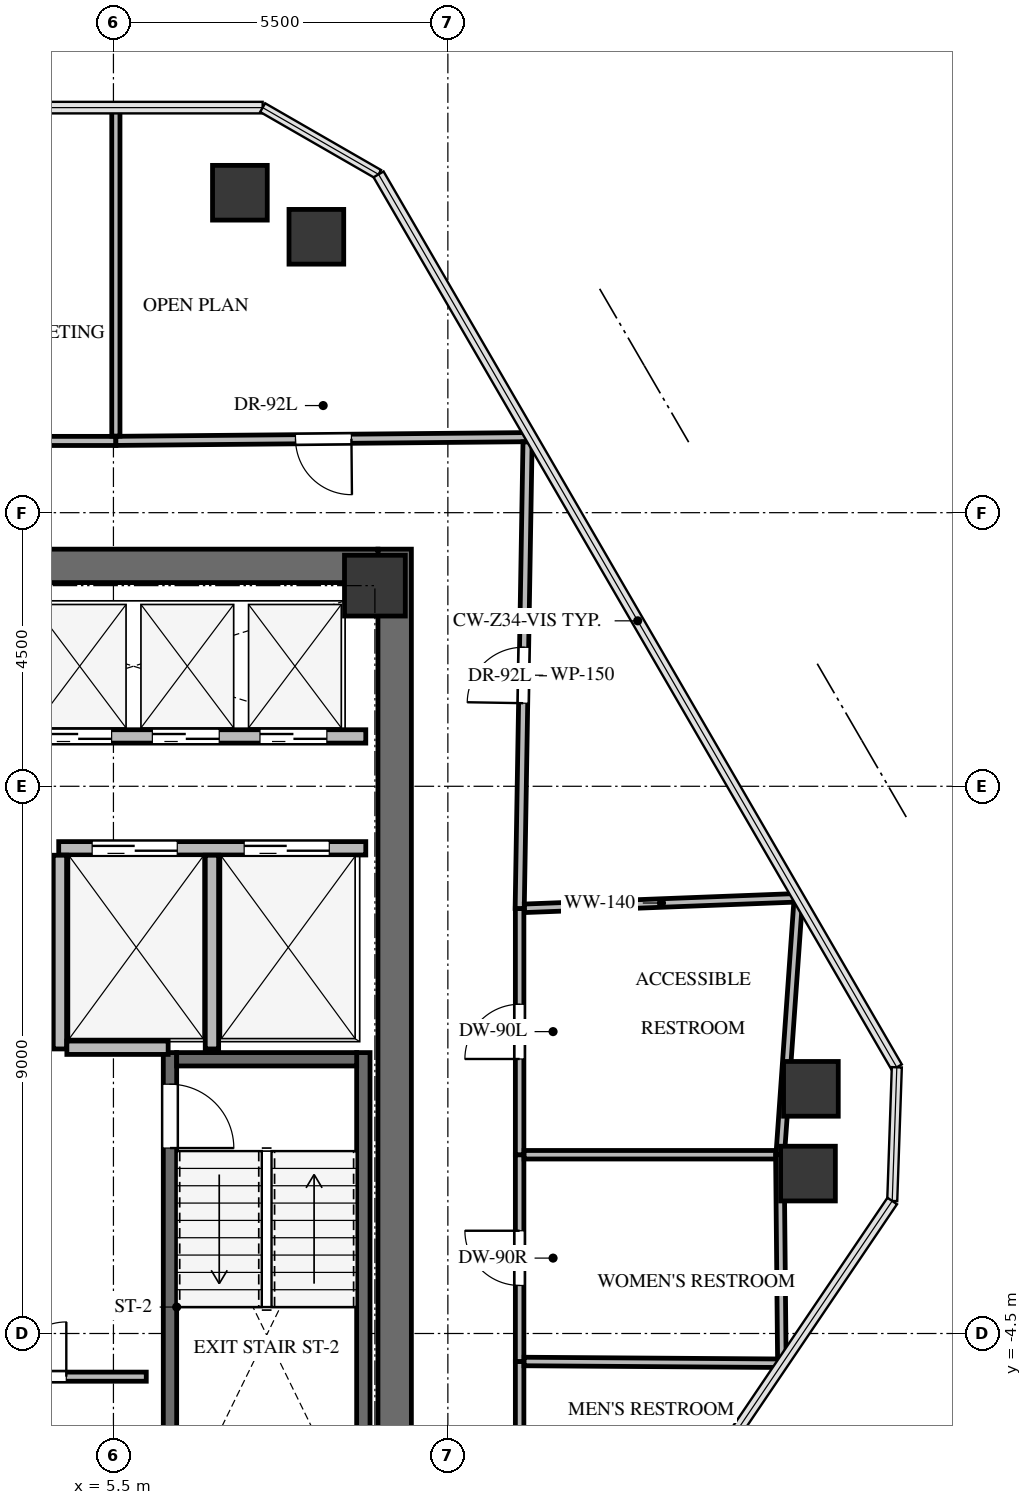
"""IFC4 building model, lengths in metres.
Left out: names, types, materials, properties, quantities, classifications, styles, units other than length and angle.
Written with IfcOpenShell. Run it as: python <this file> out.ifc"""

import sys

from ifc_helpers import new_model, si_unit, direction, frame, frame_2d, origin, origin_2d, place, context, subcontext, project, spatial, rectangle, extrude, source, transform, mapped, element, fill, save


model = new_model("IFC4")
c1 = context("Model", 3, precision=1e-05, world=origin(), true_north=direction((0.0, 1.0)))
c2 = subcontext(c1, "Body", "Model", "MODEL_VIEW")
j1 = project(units=[si_unit("LENGTHUNIT", "METRE"), si_unit("PLANEANGLEUNIT", "RADIAN")], contexts=[c1])
p1 = place(None, origin())
s1 = spatial("IfcSite", under=j1, at=p1, CompositionType="ELEMENT")
p2 = place(p1, origin())
s2 = spatial("IfcBuilding", under=s1, at=p2, CompositionType="ELEMENT")
p3 = place(p2, frame((0.0, 0.0, 254.7)))
s3 = spatial("IfcBuildingStorey", under=s2, at=p3, CompositionType="ELEMENT", Elevation=254.7)
p4 = place(p3, frame((10.125, -8.4, 0.0), z_axis=(0.0, 0.0, 1.0), x_axis=(0.0, 1.0, 0.0)))
e1 = element("IfcWall", 1, at=p4, inside=s3, PredefinedType="SHEAR", context=c2, shape_type="SweptSolid", body=[
    extrude(rectangle(XDim=16.8, YDim=0.55, at=frame_2d((8.4, 0.0))), origin(), (0.0, 0.0, 1.0), 3.4),
])
p5 = place(p3, frame((-9.85, 8.125, 0.0), z_axis=(0.0, 0.0, 1.0), x_axis=(1.0, 0.0, 0.0)))
e2 = element("IfcWall", 2, at=p5, inside=s3, PredefinedType="SHEAR", context=c2, shape_type="SweptSolid", body=[
    extrude(rectangle(XDim=19.7, YDim=0.55, at=frame_2d((9.85, 0.0))), origin(), (0.0, 0.0, 1.0), 3.4),
])
p6 = place(p3, frame((9.61, -7.77, -0.24), z_axis=(0.0, 0.0, 1.0), x_axis=(0.0, 1.0, 0.0)))
e3 = element("IfcWall", 3, at=p6, inside=s3, PredefinedType="SHEAR", context=c2, shape_type="SweptSolid", body=[
    extrude(rectangle(XDim=7.89, YDim=0.22, at=frame_2d((3.945, 0.0))), origin(), (0.0, 0.0, 1.0), 3.4),
])
p7 = place(p3, frame((6.43, 0.12, -0.24), z_axis=(0.0, 0.0, 1.0), x_axis=(0.0, -1.0, 0.0)))
e4 = element("IfcWall", 4, at=p7, inside=s3, PredefinedType="SHEAR", context=c2, shape_type="SweptSolid", body=[
    extrude(rectangle(XDim=7.89, YDim=0.22, at=frame_2d((3.945, 0.0))), origin(), (0.0, 0.0, 1.0), 3.4),
])
p8 = place(p7, frame((0.52, 0.0, 0.0)))
e5 = element("IfcOpeningElement", 5, at=p8, cuts=e4, PredefinedType="OPENING", context=c2, shape_type="SweptSolid", body=[
    extrude(rectangle(XDim=1.05, YDim=2.15, at=frame_2d((0.525, 1.075))), frame((0.0, 0.12, 0.0), z_axis=(0.0, -1.0, 0.0), x_axis=(1.0, 0.0, 0.0)), (0.0, 0.0, 1.0), 0.24),
])
p9 = place(p3, frame((9.5, 0.01, -0.24), z_axis=(0.0, 0.0, 1.0), x_axis=(-1.0, 0.0, 0.0)))
e6 = element("IfcWall", 6, at=p9, inside=s3, PredefinedType="SHEAR", context=c2, shape_type="SweptSolid", body=[
    extrude(rectangle(XDim=2.96, YDim=0.22, at=frame_2d((1.48, 0.0))), origin(), (0.0, 0.0, 1.0), 3.4),
])
m1 = source(origin(), c2, "Body", "SweptSolid", [
    extrude(rectangle(XDim=1.0, YDim=1.0, at=origin_2d()), origin(), (0.0, 0.0, 1.0), 3.4),
])
p10 = place(p3, frame((9.8, 7.8, -0.24), z_axis=(0.0, 0.0, 1.0), x_axis=(1.0, 0.0, 0.0)))
e7 = element("IfcColumn", 7, at=p10, inside=s3, PredefinedType="COLUMN", context=c2, shape_type="MappedRepresentation", body=[
    mapped(m1, transform((0.0, 0.0, 0.0), x_axis=(1.0, 0.0, 0.0), y_axis=(0.0, 1.0, 0.0), z_axis=(0.0, 0.0, 1.0), scale=1.0)),
])
m2 = source(origin(), c2, "Body", "SweptSolid", [
    extrude(rectangle(XDim=0.9, YDim=0.9, at=origin_2d()), origin(), (0.0, 0.0, 1.0), 3.4),
])
for number, where, z_axis, x_axis in (
    (8, (7.58, 14.262, -0.24), (0.0, 0.0, 1.0), (1.0, 0.0, 0.0)),
    (9, (8.837, 13.538, -0.24), (0.0, 0.0, 1.0), (1.0, 0.0, 0.0)),
    (10, (16.97, -0.476, -0.24), (0.0, 0.0, 1.0), (1.0, 0.0, 0.0)),
    (11, (16.922, -1.87, -0.24), (0.0, 0.0, 1.0), (1.0, 0.0, 0.0)),
):
    element("IfcColumn", number, at=place(p3, frame(where, z_axis=z_axis, x_axis=x_axis)), inside=s3, PredefinedType="COLUMN", context=c2, shape_type="MappedRepresentation", body=[
        mapped(m2, transform((0.0, 0.0, 0.0), x_axis=(1.0, 0.0, 0.0), y_axis=(0.0, 1.0, 0.0), z_axis=(0.0, 0.0, 1.0), scale=1.0)),
    ])
p11 = place(p3, frame((4.6, 3.48, 0.0), z_axis=(0.0, 0.0, 1.0), x_axis=(1.0, 0.0, 0.0)))
e12 = element("IfcWall", 12, at=p11, inside=s3, PredefinedType="SOLIDWALL", context=c2, shape_type="SweptSolid", body=[
    extrude(rectangle(XDim=5.05, YDim=0.22, at=frame_2d((2.525, 0.0))), origin(), (0.0, 0.0, 1.0), 3.145),
])
p12 = place(p11, frame((0.55, 0.0, 0.0)))
e13 = element("IfcOpeningElement", 13, at=p12, cuts=e12, PredefinedType="OPENING", context=c2, shape_type="SweptSolid", body=[
    extrude(rectangle(XDim=1.4, YDim=2.15, at=frame_2d((0.7, 1.075))), frame((0.0, 0.12, 0.0), z_axis=(0.0, -1.0, 0.0), x_axis=(1.0, 0.0, 0.0)), (0.0, 0.0, 1.0), 0.24),
])
p13 = place(p11, frame((3.05, 0.0, 0.0)))
e14 = element("IfcOpeningElement", 14, at=p13, cuts=e12, PredefinedType="OPENING", context=c2, shape_type="SweptSolid", body=[
    extrude(rectangle(XDim=1.4, YDim=2.15, at=frame_2d((0.7, 1.075))), frame((0.0, 0.12, 0.0), z_axis=(0.0, -1.0, 0.0), x_axis=(1.0, 0.0, 0.0)), (0.0, 0.0, 1.0), 0.24),
])
for number, where, z_axis, x_axis in (
    (15, (4.62, 0.18, 0.0), (0.0, 0.0, 1.0), (0.0, 1.0, 0.0)),
    (16, (7.12, 0.18, 0.0), (0.0, 0.0, 1.0), (0.0, 1.0, 0.0)),
):
    element("IfcWall", number, at=place(p3, frame(where, z_axis=z_axis, x_axis=x_axis)), inside=s3, PredefinedType="SOLIDWALL", context=c2, shape_type="SweptSolid", body=[
        extrude(rectangle(XDim=3.186, YDim=0.22, at=frame_2d((1.593, 0.0))), origin(), (0.0, 0.0, 1.0), 3.145),
    ])
p14 = place(p3, frame((4.734, 0.2, 0.0), z_axis=(0.0, 0.0, 1.0), x_axis=(1.0, 0.0, 0.0)))
e17 = element("IfcWall", 17, at=p14, inside=s3, PredefinedType="SOLIDWALL", context=c2, shape_type="SweptSolid", body=[
    extrude(rectangle(XDim=1.666, YDim=0.22, at=frame_2d((0.833, 0.0))), origin(), (0.0, 0.0, 1.0), 3.145),
])
p15 = place(p3, frame((2.325, 5.32, 0.0), z_axis=(0.0, 0.0, 1.0), x_axis=(1.0, 0.0, 0.0)))
e18 = element("IfcWall", 18, at=p15, inside=s3, PredefinedType="SOLIDWALL", context=c2, shape_type="SweptSolid", body=[
    extrude(rectangle(XDim=7.325, YDim=0.22, at=frame_2d((3.663, 0.0))), origin(), (0.0, 0.0, 1.0), 3.145),
])
p16 = place(p15, frame((0.275, 0.0, 0.0)))
e19 = element("IfcOpeningElement", 19, at=p16, cuts=e18, PredefinedType="OPENING", context=c2, shape_type="SweptSolid", body=[
    extrude(rectangle(XDim=1.1, YDim=2.15, at=frame_2d((0.55, 1.075))), frame((0.0, 0.12, 0.0), z_axis=(0.0, -1.0, 0.0), x_axis=(1.0, 0.0, 0.0)), (0.0, 0.0, 1.0), 0.24),
])
p17 = place(p15, frame((2.045, 0.0, 0.0)))
e20 = element("IfcOpeningElement", 20, at=p17, cuts=e18, PredefinedType="OPENING", context=c2, shape_type="SweptSolid", body=[
    extrude(rectangle(XDim=1.1, YDim=2.15, at=frame_2d((0.55, 1.075))), frame((0.0, 0.12, 0.0), z_axis=(0.0, -1.0, 0.0), x_axis=(1.0, 0.0, 0.0)), (0.0, 0.0, 1.0), 0.24),
])
p18 = place(p15, frame((3.815, 0.0, 0.0)))
e21 = element("IfcOpeningElement", 21, at=p18, cuts=e18, PredefinedType="OPENING", context=c2, shape_type="SweptSolid", body=[
    extrude(rectangle(XDim=1.1, YDim=2.15, at=frame_2d((0.55, 1.075))), frame((0.0, 0.12, 0.0), z_axis=(0.0, -1.0, 0.0), x_axis=(1.0, 0.0, 0.0)), (0.0, 0.0, 1.0), 0.24),
])
p19 = place(p15, frame((5.585, 0.0, 0.0)))
e22 = element("IfcOpeningElement", 22, at=p19, cuts=e18, PredefinedType="OPENING", context=c2, shape_type="SweptSolid", body=[
    extrude(rectangle(XDim=1.1, YDim=2.15, at=frame_2d((0.55, 1.075))), frame((0.0, 0.12, 0.0), z_axis=(0.0, -1.0, 0.0), x_axis=(1.0, 0.0, 0.0)), (0.0, 0.0, 1.0), 0.24),
])
p20 = place(p3, frame((2.51, -5.21, 0.0), z_axis=(0.0, 0.0, 1.0), x_axis=(1.0, 0.0, 0.0)))
e23 = element("IfcWall", 23, at=p20, inside=s3, PredefinedType="PARTITIONING", context=c2, shape_type="SweptSolid", body=[
    extrude(rectangle(XDim=3.53, YDim=0.15, at=frame_2d((1.765, 0.0))), origin(), (0.0, 0.0, 1.0), 3.145),
])
p21 = place(p20, frame((1.315, 0.0, 0.0)))
e24 = element("IfcOpeningElement", 24, at=p21, cuts=e23, PredefinedType="OPENING", context=c2, shape_type="SweptSolid", body=[
    extrude(rectangle(XDim=0.9, YDim=2.05, at=frame_2d((0.45, 1.025))), frame((0.0, 0.085, 0.0), z_axis=(0.0, -1.0, 0.0), x_axis=(1.0, 0.0, 0.0)), (0.0, 0.0, 1.0), 0.17),
])
p22 = place(p3, frame((12.18, -8.44, 0.0), z_axis=(0.0, 0.0, 1.0), x_axis=(0.0, 1.0, 0.0)))
e25 = element("IfcWall", 25, at=p22, inside=s3, PredefinedType="PARTITIONING", context=c2, shape_type="SweptSolid", body=[
    extrude(rectangle(XDim=3.48, YDim=0.14, at=frame_2d((1.74, 0.0))), origin(), (0.0, 0.0, 1.0), 2.499),
])
p23 = place(p22, frame((1.29, 0.0, 0.0)))
e26 = element("IfcOpeningElement", 26, at=p23, cuts=e25, PredefinedType="OPENING", context=c2, shape_type="SweptSolid", body=[
    extrude(rectangle(XDim=0.9, YDim=2.05, at=frame_2d((0.45, 1.025))), frame((0.0, 0.08, 0.0), z_axis=(0.0, -1.0, 0.0), x_axis=(1.0, 0.0, 0.0)), (0.0, 0.0, 1.0), 0.16),
])
p24 = place(p3, frame((12.18, -4.96, 0.0), z_axis=(0.0, 0.0, 1.0), x_axis=(0.0, 1.0, 0.0)))
e27 = element("IfcWall", 27, at=p24, inside=s3, PredefinedType="PARTITIONING", context=c2, shape_type="SweptSolid", body=[
    extrude(rectangle(XDim=3.4, YDim=0.14, at=frame_2d((1.7, 0.0))), origin(), (0.0, 0.0, 1.0), 3.145),
])
p25 = place(p24, frame((1.25, 0.0, 0.0)))
e28 = element("IfcOpeningElement", 28, at=p25, cuts=e27, PredefinedType="OPENING", context=c2, shape_type="SweptSolid", body=[
    extrude(rectangle(XDim=0.9, YDim=2.05, at=frame_2d((0.45, 1.025))), frame((0.0, 0.08, 0.0), z_axis=(0.0, -1.0, 0.0), x_axis=(1.0, 0.0, 0.0)), (0.0, 0.0, 1.0), 0.16),
])
p26 = place(p3, frame((12.18, -1.56, 0.0), z_axis=(0.0, 0.0, 1.0), x_axis=(0.0, 1.0, 0.0)))
e29 = element("IfcWall", 29, at=p26, inside=s3, PredefinedType="PARTITIONING", context=c2, shape_type="SweptSolid", body=[
    extrude(rectangle(XDim=4.05, YDim=0.14, at=frame_2d((2.025, 0.0))), origin(), (0.0, 0.0, 1.0), 2.401),
])
p27 = place(p26, frame((1.575, 0.0, 0.0)))
e30 = element("IfcOpeningElement", 30, at=p27, cuts=e29, PredefinedType="OPENING", context=c2, shape_type="SweptSolid", body=[
    extrude(rectangle(XDim=0.9, YDim=2.05, at=frame_2d((0.45, 1.025))), frame((0.0, 0.08, 0.0), z_axis=(0.0, -1.0, 0.0), x_axis=(1.0, 0.0, 0.0)), (0.0, 0.0, 1.0), 0.16),
])
p28 = place(p3, frame((5.54, 10.18, 0.0), z_axis=(0.0, 0.0, 1.0), x_axis=(-1.0, 0.0, 0.0)))
e31 = element("IfcWall", 31, at=p28, inside=s3, PredefinedType="PARTITIONING", context=c2, shape_type="SweptSolid", body=[
    extrude(rectangle(XDim=4.451, YDim=0.15, at=frame_2d((2.226, 0.0))), origin(), (0.0, 0.0, 1.0), 2.708),
])
p29 = place(p3, frame((12.368, 10.243, 0.0), z_axis=(0.0, 0.0, 1.0), x_axis=(-0.999958440586, -0.009116858034, 0.0)))
e32 = element("IfcWall", 32, at=p29, inside=s3, PredefinedType="PARTITIONING", context=c2, shape_type="SweptSolid", body=[
    extrude(rectangle(XDim=6.829, YDim=0.15, at=frame_2d((3.414, 0.0))), origin(), (0.0, 0.0, 1.0), 2.401),
])
p30 = place(p29, frame((2.954, 0.0, 0.0)))
e33 = element("IfcOpeningElement", 33, at=p30, cuts=e32, PredefinedType="OPENING", context=c2, shape_type="SweptSolid", body=[
    extrude(rectangle(XDim=0.92, YDim=2.1, at=frame_2d((0.46, 1.05))), frame((0.0, 0.085, 0.0), z_axis=(0.0, -1.0, 0.0), x_axis=(1.0, 0.0, 0.0)), (0.0, 0.0, 1.0), 0.17),
])
p31 = place(p3, frame((12.181, 2.49, 0.0), z_axis=(0.0, 0.0, 1.0), x_axis=(0.016828669653, 0.999858387912, 0.0)))
e34 = element("IfcWall", 34, at=p31, inside=s3, PredefinedType="PARTITIONING", context=c2, shape_type="SweptSolid", body=[
    extrude(rectangle(XDim=7.674, YDim=0.15, at=frame_2d((3.837, 0.0))), origin(), (0.0, 0.0, 1.0), 2.499),
])
p32 = place(p31, frame((3.377, 0.0, 0.0)))
e35 = element("IfcOpeningElement", 35, at=p32, cuts=e34, PredefinedType="OPENING", context=c2, shape_type="SweptSolid", body=[
    extrude(rectangle(XDim=0.92, YDim=2.1, at=frame_2d((0.46, 1.05))), frame((0.0, 0.085, 0.0), z_axis=(0.0, -1.0, 0.0), x_axis=(1.0, 0.0, 0.0)), (0.0, 0.0, 1.0), 0.17),
])
p33 = place(p3, frame((12.254, -4.96, 0.0), z_axis=(0.0, 0.0, 1.0), x_axis=(0.999976630429, -0.006836563198, 0.0)))
e36 = element("IfcWall", 36, at=p33, inside=s3, PredefinedType="PARTITIONING", context=c2, shape_type="SweptSolid", body=[
    extrude(rectangle(XDim=4.25, YDim=0.14, at=frame_2d((2.125, 0.0))), origin(), (0.0, 0.0, 1.0), 2.499),
])
p34 = place(p3, frame((12.254, -1.56, 0.0), z_axis=(0.0, 0.0, 1.0), x_axis=(1.0, 0.0, 0.0)))
e37 = element("IfcWall", 37, at=p34, inside=s3, PredefinedType="PARTITIONING", context=c2, shape_type="SweptSolid", body=[
    extrude(rectangle(XDim=4.206, YDim=0.14, at=frame_2d((2.103, 0.0))), origin(), (0.0, 0.0, 1.0), 2.401),
])
p35 = place(p3, frame((16.46, -1.56, 0.0), z_axis=(0.0, 0.0, 1.0), x_axis=(0.009604446748, -0.999953876238, 0.0)))
e38 = element("IfcWall", 38, at=p35, inside=s3, PredefinedType="PARTITIONING", context=c2, shape_type="SweptSolid", body=[
    extrude(rectangle(XDim=3.355, YDim=0.14, at=frame_2d((1.678, 0.0))), origin(), (0.0, 0.0, 1.0), 2.401),
])
p36 = place(p3, frame((12.26, 2.493, 0.0), z_axis=(0.0, 0.0, 1.0), x_axis=(0.999256206289, 0.038562082324, 0.0)))
e39 = element("IfcWall", 39, at=p36, inside=s3, PredefinedType="PARTITIONING", context=c2, shape_type="SweptSolid", body=[
    extrude(rectangle(XDim=4.508, YDim=0.14, at=frame_2d((2.254, 0.0))), origin(), (0.0, 0.0, 1.0), 2.499),
])
p37 = place(p3, frame((16.76, 2.593, 0.0), z_axis=(0.0, 0.0, 1.0), x_axis=(-0.07055102187, -0.997508172053, 0.0)))
e40 = element("IfcWall", 40, at=p37, inside=s3, PredefinedType="PARTITIONING", context=c2, shape_type="SweptSolid", body=[
    extrude(rectangle(XDim=4.163, YDim=0.14, at=frame_2d((2.082, 0.0))), origin(), (0.0, 0.0, 1.0), 2.401),
])
p38 = place(p3, frame((5.54, 15.662, 0.0), z_axis=(0.0, 0.0, 1.0), x_axis=(0.0, -1.0, 0.0)))
e41 = element("IfcWall", 41, at=p38, inside=s3, PredefinedType="PARTITIONING", context=c2, shape_type="SweptSolid", body=[
    extrude(rectangle(XDim=5.402, YDim=0.135, at=frame_2d((2.701, 0.0))), origin(), (0.0, 0.0, 1.0), 2.499),
])
m3 = source(origin(), c2, "Body", "SweptSolid", [
    extrude(rectangle(XDim=1.05, YDim=2.15, at=frame_2d((0.525, 1.075))), frame((0.0, 0.025, 0.0), z_axis=(0.0, -1.0, 0.0), x_axis=(1.0, 0.0, 0.0)), (0.0, 0.0, 1.0), 0.05),
])
p39 = place(p8, origin())
e42 = element("IfcDoor", 42, at=p39, inside=s3, OperationType="SINGLE_SWING_RIGHT", PredefinedType="DOOR", context=c2, shape_type="MappedRepresentation", body=[
    mapped(m3, transform((0.0, 0.0, 0.0), x_axis=(1.0, 0.0, 0.0), y_axis=(0.0, 1.0, 0.0), z_axis=(0.0, 0.0, 1.0), scale=1.0)),
])
fill(e5, e42)
m4 = source(origin(), c2, "Body", "SweptSolid", [
    extrude(rectangle(XDim=1.4, YDim=2.15, at=frame_2d((0.7, 1.075))), frame((0.0, 0.025, 0.0), z_axis=(0.0, -1.0, 0.0), x_axis=(1.0, 0.0, 0.0)), (0.0, 0.0, 1.0), 0.05),
])
p40 = place(p12, origin())
e43 = element("IfcDoor", 43, at=p40, inside=s3, OperationType="DOUBLE_DOOR_SLIDING", PredefinedType="DOOR", context=c2, shape_type="MappedRepresentation", body=[
    mapped(m4, transform((0.0, 0.0, 0.0), x_axis=(1.0, 0.0, 0.0), y_axis=(0.0, 1.0, 0.0), z_axis=(0.0, 0.0, 1.0), scale=1.0)),
])
fill(e13, e43)
p41 = place(p13, origin())
e44 = element("IfcDoor", 44, at=p41, inside=s3, OperationType="DOUBLE_DOOR_SLIDING", PredefinedType="DOOR", context=c2, shape_type="MappedRepresentation", body=[
    mapped(m4, transform((0.0, 0.0, 0.0), x_axis=(1.0, 0.0, 0.0), y_axis=(0.0, 1.0, 0.0), z_axis=(0.0, 0.0, 1.0), scale=1.0)),
])
fill(e14, e44)
m5 = source(origin(), c2, "Body", "SweptSolid", [
    extrude(rectangle(XDim=1.1, YDim=2.15, at=frame_2d((0.55, 1.075))), frame((0.0, 0.025, 0.0), z_axis=(0.0, -1.0, 0.0), x_axis=(1.0, 0.0, 0.0)), (0.0, 0.0, 1.0), 0.05),
])
p42 = place(p17, origin())
e45 = element("IfcDoor", 45, at=p42, inside=s3, OperationType="DOUBLE_DOOR_SLIDING", PredefinedType="DOOR", context=c2, shape_type="MappedRepresentation", body=[
    mapped(m5, transform((0.0, 0.0, 0.0), x_axis=(1.0, 0.0, 0.0), y_axis=(0.0, 1.0, 0.0), z_axis=(0.0, 0.0, 1.0), scale=1.0)),
])
fill(e20, e45)
p43 = place(p18, origin())
e46 = element("IfcDoor", 46, at=p43, inside=s3, OperationType="DOUBLE_DOOR_SLIDING", PredefinedType="DOOR", context=c2, shape_type="MappedRepresentation", body=[
    mapped(m5, transform((0.0, 0.0, 0.0), x_axis=(1.0, 0.0, 0.0), y_axis=(0.0, 1.0, 0.0), z_axis=(0.0, 0.0, 1.0), scale=1.0)),
])
fill(e21, e46)
p44 = place(p19, origin())
e47 = element("IfcDoor", 47, at=p44, inside=s3, OperationType="DOUBLE_DOOR_SLIDING", PredefinedType="DOOR", context=c2, shape_type="MappedRepresentation", body=[
    mapped(m5, transform((0.0, 0.0, 0.0), x_axis=(1.0, 0.0, 0.0), y_axis=(0.0, 1.0, 0.0), z_axis=(0.0, 0.0, 1.0), scale=1.0)),
])
fill(e22, e47)
m6 = source(origin(), c2, "Body", "SweptSolid", [
    extrude(rectangle(XDim=0.9, YDim=2.05, at=frame_2d((0.45, 1.025))), frame((0.0, 0.025, 0.0), z_axis=(0.0, -1.0, 0.0), x_axis=(1.0, 0.0, 0.0)), (0.0, 0.0, 1.0), 0.05),
])
p45 = place(p21, origin())
e48 = element("IfcDoor", 48, at=p45, inside=s3, OperationType="SINGLE_SWING_RIGHT", PredefinedType="DOOR", context=c2, shape_type="MappedRepresentation", body=[
    mapped(m6, transform((0.0, 0.0, 0.0), x_axis=(1.0, 0.0, 0.0), y_axis=(0.0, 1.0, 0.0), z_axis=(0.0, 0.0, 1.0), scale=1.0)),
])
fill(e24, e48)
m7 = source(origin(), c2, "Body", "SweptSolid", [
    extrude(rectangle(XDim=0.9, YDim=2.05, at=frame_2d((0.45, 1.025))), frame((0.0, 0.025, 0.0), z_axis=(0.0, -1.0, 0.0), x_axis=(1.0, 0.0, 0.0)), (0.0, 0.0, 1.0), 0.05),
])
p46 = place(p25, origin())
e49 = element("IfcDoor", 49, at=p46, inside=s3, OperationType="SINGLE_SWING_RIGHT", PredefinedType="DOOR", context=c2, shape_type="MappedRepresentation", body=[
    mapped(m7, transform((0.0, 0.0, 0.0), x_axis=(1.0, 0.0, 0.0), y_axis=(0.0, 1.0, 0.0), z_axis=(0.0, 0.0, 1.0), scale=1.0)),
])
fill(e28, e49)
m8 = source(origin(), c2, "Body", "SweptSolid", [
    extrude(rectangle(XDim=0.9, YDim=2.05, at=frame_2d((0.45, 1.025))), frame((0.0, 0.025, 0.0), z_axis=(0.0, -1.0, 0.0), x_axis=(1.0, 0.0, 0.0)), (0.0, 0.0, 1.0), 0.05),
])
p47 = place(p27, origin())
e50 = element("IfcDoor", 50, at=p47, inside=s3, OperationType="SINGLE_SWING_LEFT", PredefinedType="DOOR", context=c2, shape_type="MappedRepresentation", body=[
    mapped(m8, transform((0.0, 0.0, 0.0), x_axis=(1.0, 0.0, 0.0), y_axis=(0.0, 1.0, 0.0), z_axis=(0.0, 0.0, 1.0), scale=1.0)),
])
fill(e30, e50)
m9 = source(origin(), c2, "Body", "SweptSolid", [
    extrude(rectangle(XDim=0.92, YDim=2.1, at=frame_2d((0.46, 1.05))), frame((0.0, 0.025, 0.0), z_axis=(0.0, -1.0, 0.0), x_axis=(1.0, 0.0, 0.0)), (0.0, 0.0, 1.0), 0.05),
])
p48 = place(p30, origin())
e51 = element("IfcDoor", 51, at=p48, inside=s3, OperationType="SINGLE_SWING_LEFT", PredefinedType="DOOR", context=c2, shape_type="MappedRepresentation", body=[
    mapped(m9, transform((0.0, 0.0, 0.0), x_axis=(1.0, 0.0, 0.0), y_axis=(0.0, 1.0, 0.0), z_axis=(0.0, 0.0, 1.0), scale=1.0)),
])
fill(e33, e51)
p49 = place(p32, origin())
e52 = element("IfcDoor", 52, at=p49, inside=s3, OperationType="SINGLE_SWING_LEFT", PredefinedType="DOOR", context=c2, shape_type="MappedRepresentation", body=[
    mapped(m9, transform((0.0, 0.0, 0.0), x_axis=(1.0, 0.0, 0.0), y_axis=(0.0, 1.0, 0.0), z_axis=(0.0, 0.0, 1.0), scale=1.0)),
])
fill(e35, e52)
save(model, sys.argv[1])
